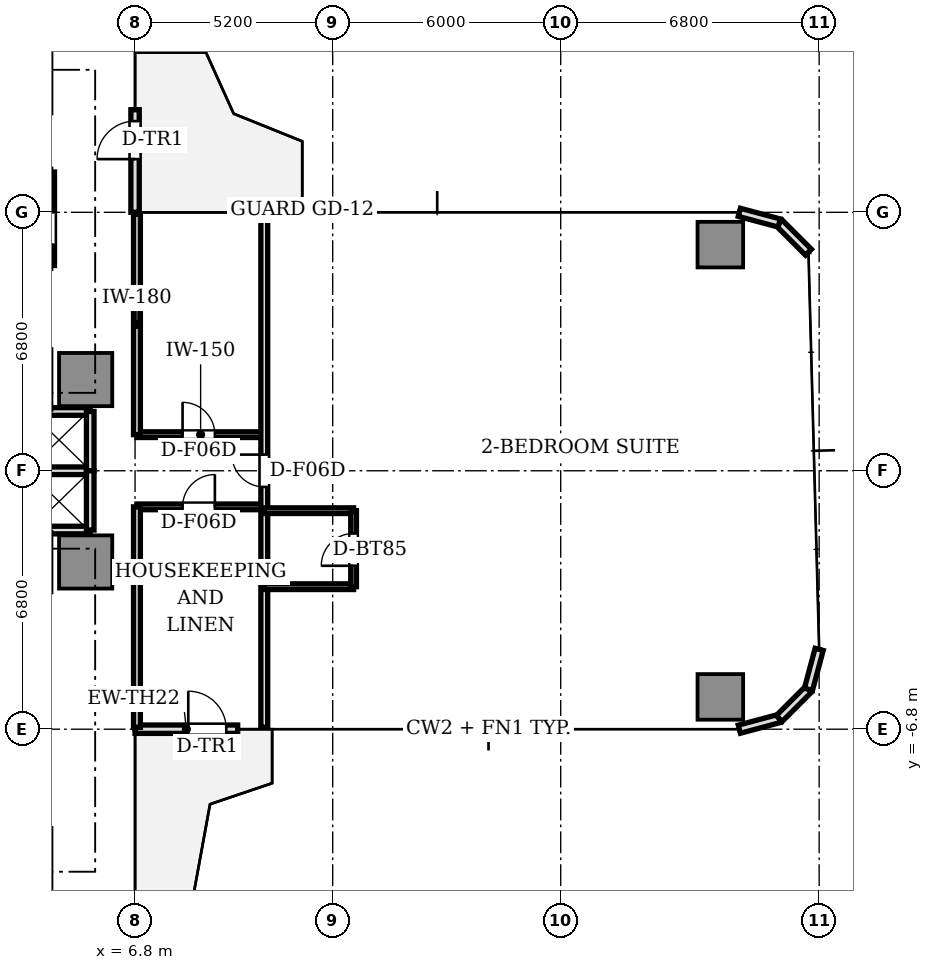
"""IFC4 building model, lengths in metres.
Left out: names, types, materials, properties, quantities, classifications, styles, units other than length and angle.
Written with IfcOpenShell. Run it as: python <this file> out.ifc"""

import sys

from ifc_helpers import new_model, si_unit, direction, frame, frame_2d, origin, origin_2d, place, context, subcontext, project, spatial, rectangle, extrude, source, transform, mapped, element, fill, save


model = new_model("IFC4")
c1 = context("Model", 3, precision=1e-05, world=origin(), true_north=direction((0.0, 1.0)))
c2 = subcontext(c1, "Body", "Model", "MODEL_VIEW")
j1 = project(units=[si_unit("LENGTHUNIT", "METRE"), si_unit("PLANEANGLEUNIT", "RADIAN")], contexts=[c1])
p1 = place(None, origin())
s1 = spatial("IfcSite", under=j1, at=p1, CompositionType="ELEMENT")
p2 = place(p1, origin())
s2 = spatial("IfcBuilding", under=s1, at=p2, CompositionType="ELEMENT")
p3 = place(p2, frame((0.0, 0.0, 54.4)))
s3 = spatial("IfcBuildingStorey", under=s2, at=p3, CompositionType="ELEMENT", Elevation=54.4)
m1 = source(origin(), c2, "Body", "SweptSolid", [
    extrude(rectangle(XDim=1.4, YDim=1.4, at=origin_2d()), origin(), (0.0, 0.0, 1.0), 3.11),
])
for number, where, z_axis, x_axis in (
    (1, (5.5, 2.4, 0.0), (0.0, 0.0, 1.0), (1.0, 0.0, 0.0)),
    (2, (5.5, -2.4, 0.0), (0.0, 0.0, 1.0), (1.0, 0.0, 0.0)),
):
    element("IfcColumn", number, at=place(p3, frame(where, z_axis=z_axis, x_axis=x_axis)), inside=s3, PredefinedType="COLUMN", context=c2, shape_type="MappedRepresentation", body=[
        mapped(m1, transform((0.0, 0.0, 0.0), scale=1.0)),
    ])
m2 = source(origin(), c2, "Body", "SweptSolid", [
    extrude(rectangle(XDim=1.2, YDim=1.2, at=origin_2d()), origin(), (0.0, 0.0, 1.0), 3.11),
])
for number, where, z_axis, x_axis in (
    (3, (22.2, -5.95, 0.0), (0.0, 0.0, 1.0), (1.0, 0.0, 0.0)),
    (4, (22.2, 5.95, 0.0), (0.0, 0.0, 1.0), (1.0, 0.0, 0.0)),
):
    element("IfcColumn", number, at=place(p3, frame(where, z_axis=z_axis, x_axis=x_axis)), inside=s3, PredefinedType="COLUMN", context=c2, shape_type="MappedRepresentation", body=[
        mapped(m2, transform((0.0, 0.0, 0.0), scale=1.0)),
    ])
p4 = place(p3, frame((6.8, -6.8, 0.0), z_axis=(0.0, 0.0, 1.0), x_axis=(1.0, 0.0, 0.0)))
e5 = element("IfcWall", 5, at=p4, inside=s3, PredefinedType="STANDARD", context=c2, shape_type="SweptSolid", body=[
    extrude(rectangle(XDim=2.7, YDim=0.22, at=frame_2d((1.35, 0.0))), origin(), (0.0, 0.0, 1.0), 3.11),
])
p5 = place(p4, frame((1.4, 0.0, 0.0)))
e6 = element("IfcOpeningElement", 6, at=p5, cuts=e5, PredefinedType="OPENING", context=c2, shape_type="SweptSolid", body=[
    extrude(rectangle(XDim=1.0, YDim=2.2, at=frame_2d((0.5, 1.1))), frame((0.0, 0.12, 0.0), z_axis=(0.0, -1.0, 0.0), x_axis=(1.0, 0.0, 0.0)), (0.0, 0.0, 1.0), 0.24),
])
for number, where, z_axis, x_axis in (
    (7, (22.7, -6.8, 0.0), (0.0, 0.0, 1.0), (0.966, 0.259, 0.0)),
    (8, (23.75, -6.519, 0.0), (0.0, 0.0, 1.0), (0.707, 0.707, 0.0)),
    (9, (24.519, -5.75, 0.0), (0.0, 0.0, 1.0), (0.259, 0.966, 0.0)),
    (10, (24.519, 5.75, 0.0), (0.0, 0.0, 1.0), (-0.707, 0.707, 0.0)),
    (11, (23.75, 6.519, 0.0), (0.0, 0.0, 1.0), (-0.966, 0.259, 0.0)),
):
    element("IfcWall", number, at=place(p3, frame(where, z_axis=z_axis, x_axis=x_axis)), inside=s3, PredefinedType="STANDARD", context=c2, shape_type="SweptSolid", body=[
        extrude(rectangle(XDim=1.087, YDim=0.22, at=frame_2d((0.543, 0.0))), origin(), (0.0, 0.0, 1.0), 3.11),
    ])
p6 = place(p3, frame((6.8, 6.8, 0.0), z_axis=(0.0, 0.0, 1.0), x_axis=(0.0, 1.0, 0.0)))
e12 = element("IfcWall", 12, at=p6, inside=s3, PredefinedType="STANDARD", context=c2, shape_type="SweptSolid", body=[
    extrude(rectangle(XDim=2.7, YDim=0.22, at=frame_2d((1.35, 0.0))), origin(), (0.0, 0.0, 1.0), 3.11),
])
p7 = place(p6, frame((1.4, 0.0, 0.0)))
e13 = element("IfcOpeningElement", 13, at=p7, cuts=e12, PredefinedType="OPENING", context=c2, shape_type="SweptSolid", body=[
    extrude(rectangle(XDim=1.0, YDim=2.2, at=frame_2d((0.5, 1.1))), frame((0.0, 0.12, 0.0), z_axis=(0.0, -1.0, 0.0), x_axis=(1.0, 0.0, 0.0)), (0.0, 0.0, 1.0), 0.24),
])
for number, where, z_axis, x_axis in (
    (14, (3.98, 1.56, 0.0), (0.0, 0.0, 1.0), (1.0, 0.0, 0.0)),
    (15, (3.98, -1.56, 0.0), (0.0, 0.0, 1.0), (1.0, 0.0, 0.0)),
    (16, (3.98, 0.0, 0.0), (0.0, 0.0, 1.0), (1.0, 0.0, 0.0)),
):
    element("IfcWall", number, at=place(p3, frame(where, z_axis=z_axis, x_axis=x_axis)), inside=s3, PredefinedType="SOLIDWALL", context=c2, shape_type="SweptSolid", body=[
        extrude(rectangle(XDim=1.64, YDim=0.2, at=frame_2d((0.82, 0.0))), origin(), (0.0, 0.0, 1.0), 2.66),
    ])
for number, where, z_axis, x_axis in (
    (17, (5.62, 0.0, 0.0), (0.0, 0.0, 1.0), (0.0, 1.0, 0.0)),
    (18, (5.62, -1.56, 0.0), (0.0, 0.0, 1.0), (0.0, 1.0, 0.0)),
):
    element("IfcWall", number, at=place(p3, frame(where, z_axis=z_axis, x_axis=x_axis)), inside=s3, PredefinedType="SOLIDWALL", context=c2, shape_type="SweptSolid", body=[
        extrude(rectangle(XDim=1.56, YDim=0.2, at=frame_2d((0.78, 0.0))), origin(), (0.0, 0.0, 1.0), 2.66),
    ])
p8 = place(p3, frame((4.58, 5.4, 0.0), z_axis=(0.0, 0.0, 1.0), x_axis=(0.0, 1.0, 0.0)))
e19 = element("IfcWall", 19, at=p8, inside=s3, PredefinedType="SOLIDWALL", context=c2, shape_type="SweptSolid", body=[
    extrude(rectangle(XDim=2.46, YDim=0.2, at=frame_2d((1.23, 0.0))), origin(), (0.0, 0.0, 1.0), 2.66),
])
p9 = place(p8, frame((0.55, 0.0, 0.0)))
e20 = element("IfcOpeningElement", 20, at=p9, cuts=e19, PredefinedType="OPENING", context=c2, shape_type="SweptSolid", body=[
    extrude(rectangle(XDim=0.85, YDim=2.1, at=frame_2d((0.425, 1.05))), frame((0.0, 0.11, 0.0), z_axis=(0.0, -1.0, 0.0), x_axis=(1.0, 0.0, 0.0)), (0.0, 0.0, 1.0), 0.22),
])
p10 = place(p3, frame((6.85, 0.95, 0.0), z_axis=(0.0, 0.0, 1.0), x_axis=(1.0, 0.0, 0.0)))
e21 = element("IfcWall", 21, at=p10, inside=s3, PredefinedType="PARTITIONING", context=c2, shape_type="SweptSolid", body=[
    extrude(rectangle(XDim=3.35, YDim=0.15, at=frame_2d((1.675, 0.0))), origin(), (0.0, 0.0, 1.0), 2.66),
])
p11 = place(p10, frame((1.2, 0.0, 0.0)))
e22 = element("IfcOpeningElement", 22, at=p11, cuts=e21, PredefinedType="OPENING", context=c2, shape_type="SweptSolid", body=[
    extrude(rectangle(XDim=0.85, YDim=2.1, at=frame_2d((0.425, 1.05))), frame((0.0, 0.085, 0.0), z_axis=(0.0, -1.0, 0.0), x_axis=(1.0, 0.0, 0.0)), (0.0, 0.0, 1.0), 0.17),
])
p12 = place(p3, frame((6.85, -0.95, 0.0), z_axis=(0.0, 0.0, 1.0), x_axis=(1.0, 0.0, 0.0)))
e23 = element("IfcWall", 23, at=p12, inside=s3, PredefinedType="PARTITIONING", context=c2, shape_type="SweptSolid", body=[
    extrude(rectangle(XDim=3.35, YDim=0.15, at=frame_2d((1.675, 0.0))), origin(), (0.0, 0.0, 1.0), 2.66),
])
p13 = place(p12, frame((1.2, 0.0, 0.0)))
e24 = element("IfcOpeningElement", 24, at=p13, cuts=e23, PredefinedType="OPENING", context=c2, shape_type="SweptSolid", body=[
    extrude(rectangle(XDim=0.85, YDim=2.1, at=frame_2d((0.425, 1.05))), frame((0.0, 0.085, 0.0), z_axis=(0.0, -1.0, 0.0), x_axis=(1.0, 0.0, 0.0)), (0.0, 0.0, 1.0), 0.17),
])
for number, where, z_axis, x_axis in (
    (25, (6.85, 0.95, 0.0), (0.0, 0.0, 1.0), (0.0, 1.0, 0.0)),
    (26, (6.85, -6.75, 0.0), (0.0, 0.0, 1.0), (0.0, 1.0, 0.0)),
):
    element("IfcWall", number, at=place(p3, frame(where, z_axis=z_axis, x_axis=x_axis)), inside=s3, PredefinedType="PARTITIONING", context=c2, shape_type="SweptSolid", body=[
        extrude(rectangle(XDim=5.8, YDim=0.18, at=frame_2d((2.9, 0.0))), origin(), (0.0, 0.0, 1.0), 2.66),
    ])
p14 = place(p3, frame((10.2, -6.75, 0.0), z_axis=(0.0, 0.0, 1.0), x_axis=(0.0, 1.0, 0.0)))
e27 = element("IfcWall", 27, at=p14, inside=s3, PredefinedType="PARTITIONING", context=c2, shape_type="SweptSolid", body=[
    extrude(rectangle(XDim=13.5, YDim=0.18, at=frame_2d((6.75, 0.0))), origin(), (0.0, 0.0, 1.0), 2.66),
])
p15 = place(p14, frame((6.325, 0.0, 0.0)))
e28 = element("IfcOpeningElement", 28, at=p15, cuts=e27, PredefinedType="OPENING", context=c2, shape_type="SweptSolid", body=[
    extrude(rectangle(XDim=0.85, YDim=2.1, at=frame_2d((0.425, 1.05))), frame((0.0, 0.1, 0.0), z_axis=(0.0, -1.0, 0.0), x_axis=(1.0, 0.0, 0.0)), (0.0, 0.0, 1.0), 0.2),
])
p16 = place(p3, frame((10.2, -1.05, 0.0), z_axis=(0.0, 0.0, 1.0), x_axis=(1.0, 0.0, 0.0)))
e29 = element("IfcWall", 29, at=p16, inside=s3, PredefinedType="PARTITIONING", context=c2, shape_type="SweptSolid", body=[
    extrude(rectangle(XDim=2.35, YDim=0.15, at=frame_2d((1.175, 0.0))), origin(), (0.0, 0.0, 1.0), 2.66),
])
p17 = place(p3, frame((10.2, -3.05, 0.0), z_axis=(0.0, 0.0, 1.0), x_axis=(1.0, 0.0, 0.0)))
e30 = element("IfcWall", 30, at=p17, inside=s3, PredefinedType="PARTITIONING", context=c2, shape_type="SweptSolid", body=[
    extrude(rectangle(XDim=2.35, YDim=0.15, at=frame_2d((1.175, 0.0))), origin(), (0.0, 0.0, 1.0), 2.63),
])
p18 = place(p3, frame((12.55, -3.05, 0.0), z_axis=(0.0, 0.0, 1.0), x_axis=(0.0, 1.0, 0.0)))
e31 = element("IfcWall", 31, at=p18, inside=s3, PredefinedType="PARTITIONING", context=c2, shape_type="SweptSolid", body=[
    extrude(rectangle(XDim=2.0, YDim=0.15, at=frame_2d((1.0, 0.0))), origin(), (0.0, 0.0, 1.0), 2.66),
])
p19 = place(p18, frame((0.55, 0.0, 0.0)))
e32 = element("IfcOpeningElement", 32, at=p19, cuts=e31, PredefinedType="OPENING", context=c2, shape_type="SweptSolid", body=[
    extrude(rectangle(XDim=0.85, YDim=2.1, at=frame_2d((0.425, 1.05))), frame((0.0, 0.085, 0.0), z_axis=(0.0, -1.0, 0.0), x_axis=(1.0, 0.0, 0.0)), (0.0, 0.0, 1.0), 0.17),
])
m3 = source(origin(), c2, "Body", "SweptSolid", [
    extrude(rectangle(XDim=1.0, YDim=0.05, at=origin_2d()), origin(), (0.0, 0.0, 1.0), 2.2),
])
p20 = place(p5, frame((0.5, 0.0, 0.0)))
e33 = element("IfcDoor", 33, at=p20, inside=s3, OperationType="SINGLE_SWING_LEFT", PredefinedType="DOOR", context=c2, shape_type="MappedRepresentation", body=[
    mapped(m3, transform((0.0, 0.0, 0.0), scale=1.0)),
])
fill(e6, e33)
p21 = place(p7, frame((0.5, 0.0, 0.0)))
e34 = element("IfcDoor", 34, at=p21, inside=s3, OperationType="SINGLE_SWING_LEFT", PredefinedType="DOOR", context=c2, shape_type="MappedRepresentation", body=[
    mapped(m3, transform((0.0, 0.0, 0.0), scale=1.0)),
])
fill(e13, e34)
m4 = source(origin(), c2, "Body", "SweptSolid", [
    extrude(rectangle(XDim=0.85, YDim=0.05, at=origin_2d()), origin(), (0.0, 0.0, 1.0), 2.1),
])
p22 = place(p11, frame((0.425, 0.0, 0.0)))
e35 = element("IfcDoor", 35, at=p22, inside=s3, OperationType="SINGLE_SWING_LEFT", PredefinedType="DOOR", context=c2, shape_type="MappedRepresentation", body=[
    mapped(m4, transform((0.0, 0.0, 0.0), scale=1.0)),
])
fill(e22, e35)
p23 = place(p13, frame((0.425, 0.0, 0.0)))
e36 = element("IfcDoor", 36, at=p23, inside=s3, OperationType="SINGLE_SWING_RIGHT", PredefinedType="DOOR", context=c2, shape_type="MappedRepresentation", body=[
    mapped(m4, transform((0.0, 0.0, 0.0), scale=1.0)),
])
fill(e24, e36)
p24 = place(p19, frame((0.425, 0.0, 0.0)))
e37 = element("IfcDoor", 37, at=p24, inside=s3, OperationType="SINGLE_SWING_LEFT", PredefinedType="DOOR", context=c2, shape_type="MappedRepresentation", body=[
    mapped(m4, transform((0.0, 0.0, 0.0), scale=1.0)),
])
fill(e32, e37)
p25 = place(p15, frame((0.425, 0.0, 0.0)))
e38 = element("IfcDoor", 38, at=p25, inside=s3, OperationType="SINGLE_SWING_RIGHT", PredefinedType="DOOR", context=c2, shape_type="MappedRepresentation", body=[
    mapped(m4, transform((0.0, 0.0, 0.0), scale=1.0)),
])
fill(e28, e38)
save(model, sys.argv[1])
